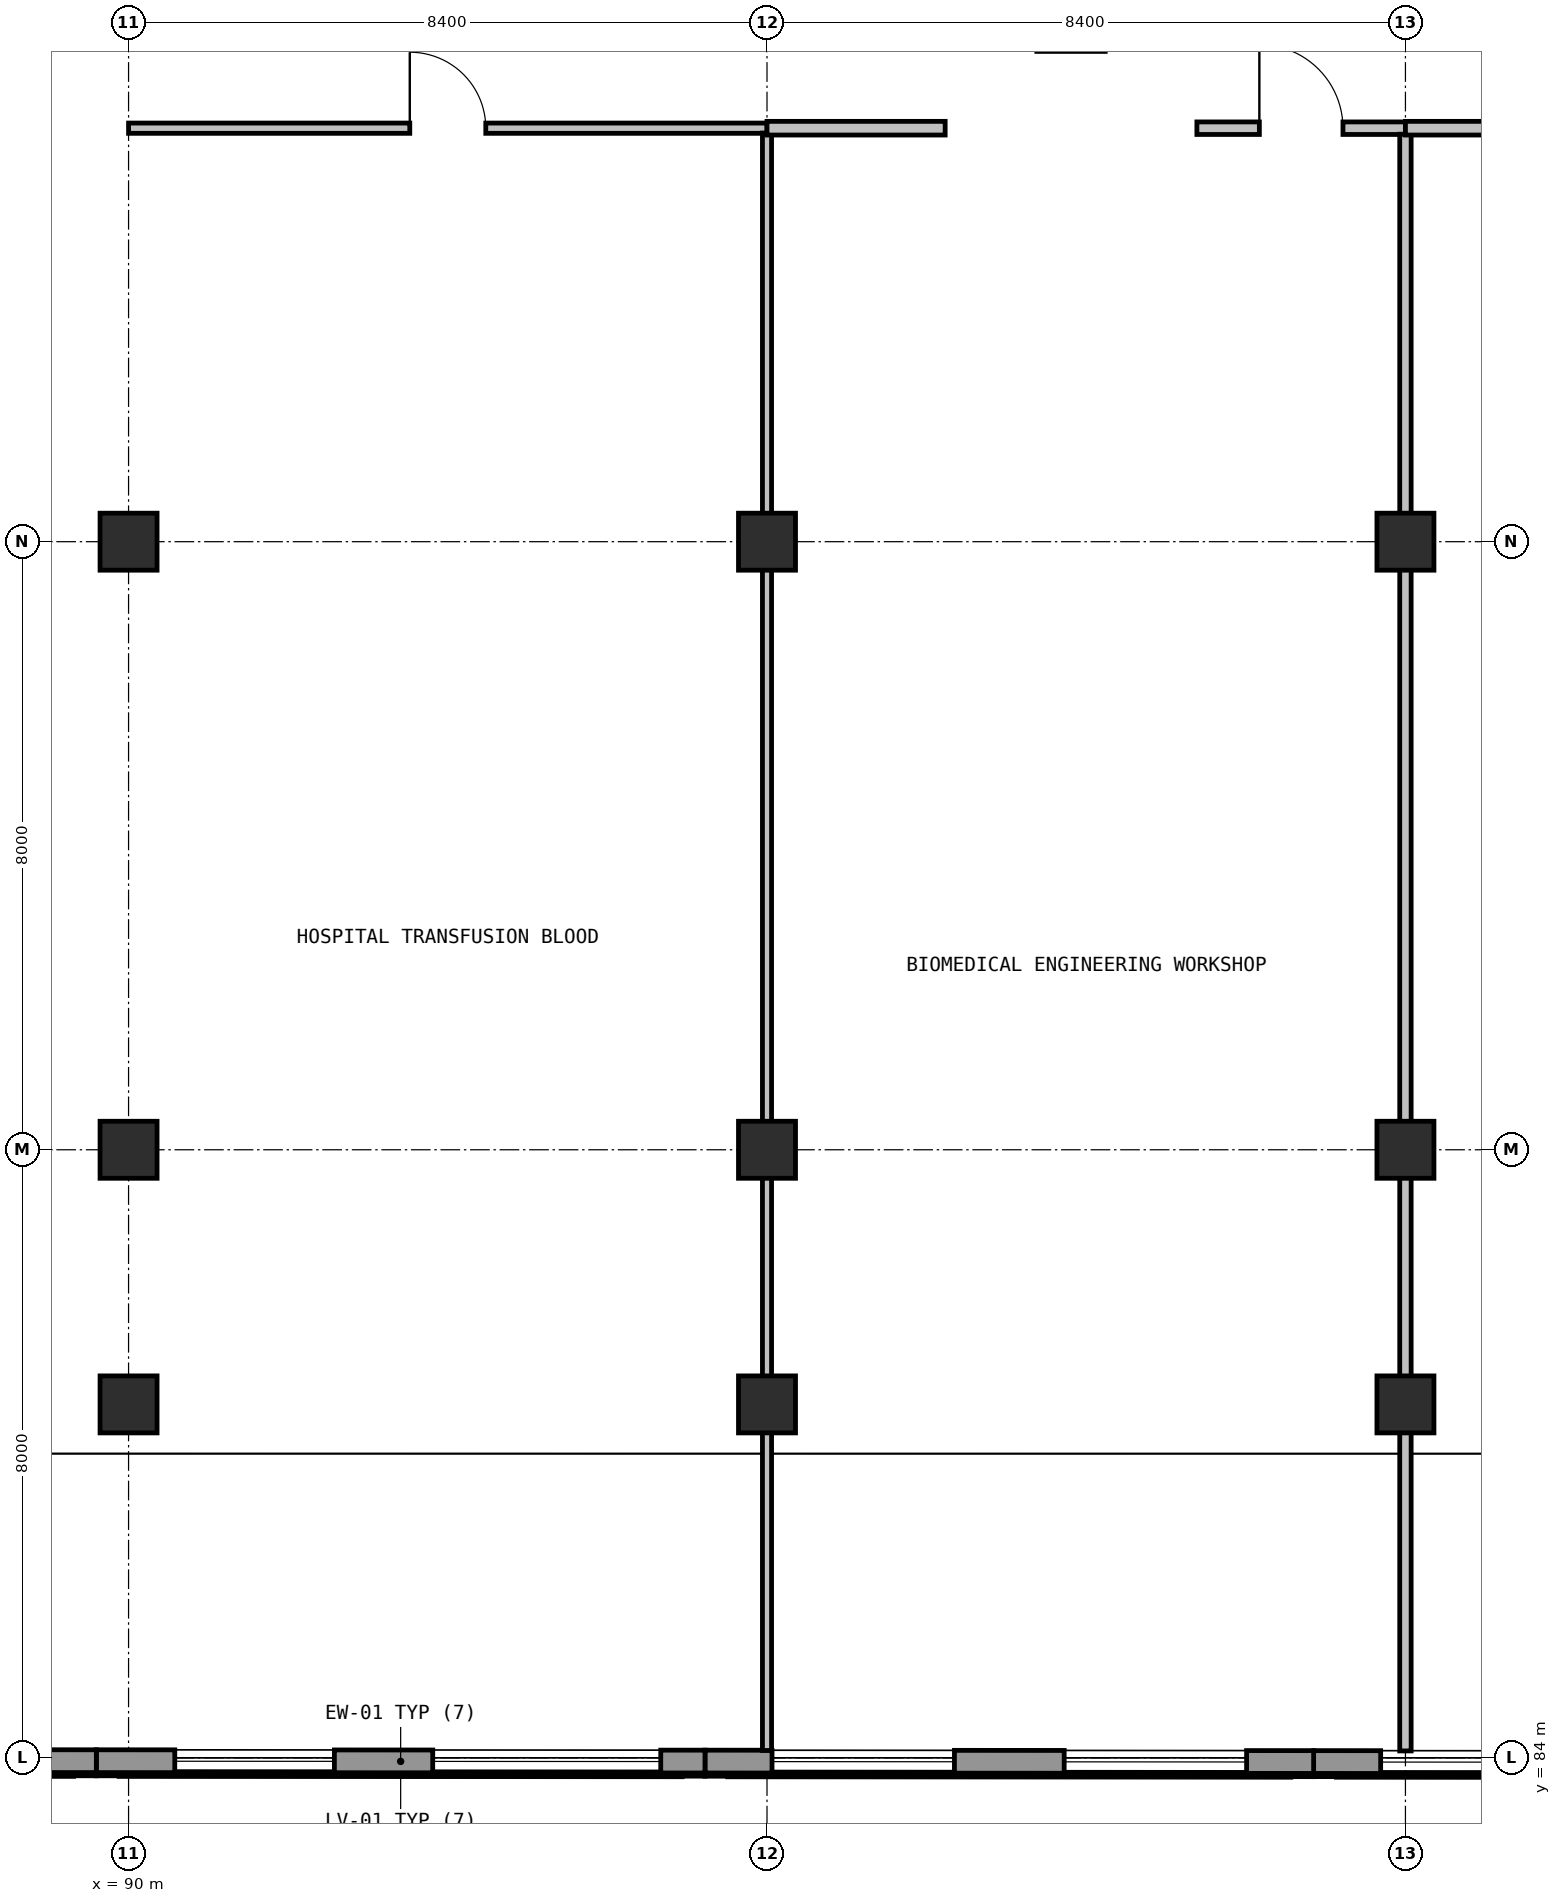
"""IFC4 building model, lengths in metres.
Left out: names, types, materials, properties, quantities, classifications, styles, units other than length and angle.
Written with IfcOpenShell. Run it as: python <this file> out.ifc"""

import sys

from ifc_helpers import new_model, si_unit, direction, frame, frame_2d, origin, origin_2d, place, context, subcontext, project, spatial, rectangle, extrude, element, fill, save


model = new_model("IFC4")
c1 = context("Model", 3, precision=1e-05, world=origin(), true_north=direction((0.0, 1.0)))
c2 = subcontext(c1, "Body", "Model", "MODEL_VIEW")
j1 = project(units=[si_unit("LENGTHUNIT", "METRE"), si_unit("PLANEANGLEUNIT", "RADIAN")], contexts=[c1])
p1 = place(None, origin())
s1 = spatial("IfcSite", under=j1, at=p1, CompositionType="ELEMENT")
p2 = place(p1, origin())
s2 = spatial("IfcBuilding", under=s1, at=p2, CompositionType="ELEMENT")
p3 = place(p2, frame((0.0, 0.0, 15.0)))
s3 = spatial("IfcBuildingStorey", under=s2, at=p3, CompositionType="ELEMENT", Elevation=15.0)
for number, where, z_axis, x_axis in (
    (1, (90.0, 88.65, 0.0), (0.0, 0.0, 1.0), (1.0, 0.0, 0.0)),
    (2, (90.0, 92.0, 0.0), (0.0, 0.0, 1.0), (1.0, 0.0, 0.0)),
    (3, (90.0, 100.0, 0.0), (0.0, 0.0, 1.0), (1.0, 0.0, 0.0)),
    (4, (98.4, 88.65, 0.0), (0.0, 0.0, 1.0), (1.0, 0.0, 0.0)),
    (5, (98.4, 92.0, 0.0), (0.0, 0.0, 1.0), (1.0, 0.0, 0.0)),
    (6, (98.4, 100.0, 0.0), (0.0, 0.0, 1.0), (1.0, 0.0, 0.0)),
    (7, (106.8, 88.65, 0.0), (0.0, 0.0, 1.0), (1.0, 0.0, 0.0)),
    (8, (106.8, 92.0, 0.0), (0.0, 0.0, 1.0), (1.0, 0.0, 0.0)),
    (9, (106.8, 100.0, 0.0), (0.0, 0.0, 1.0), (1.0, 0.0, 0.0)),
):
    element("IfcColumn", number, at=place(p3, frame(where, z_axis=z_axis, x_axis=x_axis)), inside=s3, PredefinedType="COLUMN", context=c2, shape_type="SweptSolid", body=[
        extrude(rectangle(XDim=0.75, YDim=0.75, at=origin_2d()), origin(), (0.0, 0.0, 1.0), 4.2),
    ])
p4 = place(p3, frame((113.6, 83.94, 0.0), z_axis=(0.0, 0.0, 1.0), x_axis=(-0.999999795056, 0.000640224252, 0.0)))
e10 = element("IfcWall", 10, at=p4, inside=s3, PredefinedType="SOLIDWALL", context=c2, shape_type="SweptSolid", body=[
    extrude(rectangle(XDim=8.008, YDim=0.3, at=frame_2d((4.004, 0.0))), origin(), (0.0, 0.0, 1.0), 3.895),
])
p5 = place(p4, frame((0.882, 0.0, 0.96)))
e11 = element("IfcOpeningElement", 11, at=p5, cuts=e10, PredefinedType="OPENING", context=c2, shape_type="SweptSolid", body=[
    extrude(rectangle(XDim=2.4, YDim=1.2, at=frame_2d((1.2, 0.6))), frame((0.0, 0.16, 0.0), z_axis=(0.0, -1.0, 0.0), x_axis=(1.0, 0.0, 0.0)), (0.0, 0.0, 1.0), 0.32),
])
p6 = place(p4, frame((4.726, 0.0, 0.96)))
e12 = element("IfcOpeningElement", 12, at=p6, cuts=e10, PredefinedType="OPENING", context=c2, shape_type="SweptSolid", body=[
    extrude(rectangle(XDim=2.4, YDim=1.2, at=frame_2d((1.2, 0.6))), frame((0.0, 0.16, 0.0), z_axis=(0.0, -1.0, 0.0), x_axis=(1.0, 0.0, 0.0)), (0.0, 0.0, 1.0), 0.32),
])
p7 = place(p3, frame((105.592, 83.945, 0.0), z_axis=(0.0, 0.0, 1.0), x_axis=(-0.999999732319, 0.000731684814, 0.0)))
e13 = element("IfcWall", 13, at=p7, inside=s3, PredefinedType="SOLIDWALL", context=c2, shape_type="SweptSolid", body=[
    extrude(rectangle(XDim=8.008, YDim=0.3, at=frame_2d((4.004, 0.0))), origin(), (0.0, 0.0, 1.0), 3.895),
])
p8 = place(p7, frame((0.882, 0.0, 0.96)))
e14 = element("IfcOpeningElement", 14, at=p8, cuts=e13, PredefinedType="OPENING", context=c2, shape_type="SweptSolid", body=[
    extrude(rectangle(XDim=2.4, YDim=1.2, at=frame_2d((1.2, 0.6))), frame((0.0, 0.16, 0.0), z_axis=(0.0, -1.0, 0.0), x_axis=(1.0, 0.0, 0.0)), (0.0, 0.0, 1.0), 0.32),
])
p9 = place(p7, frame((4.726, 0.0, 0.96)))
e15 = element("IfcOpeningElement", 15, at=p9, cuts=e13, PredefinedType="OPENING", context=c2, shape_type="SweptSolid", body=[
    extrude(rectangle(XDim=2.4, YDim=1.2, at=frame_2d((1.2, 0.6))), frame((0.0, 0.16, 0.0), z_axis=(0.0, -1.0, 0.0), x_axis=(1.0, 0.0, 0.0)), (0.0, 0.0, 1.0), 0.32),
])
p10 = place(p3, frame((97.584, 83.951, 0.0), z_axis=(0.0, 0.0, 1.0), x_axis=(-0.999999795056, 0.000640224252, 0.0)))
e16 = element("IfcWall", 16, at=p10, inside=s3, PredefinedType="SOLIDWALL", context=c2, shape_type="SweptSolid", body=[
    extrude(rectangle(XDim=8.008, YDim=0.3, at=frame_2d((4.004, 0.0))), origin(), (0.0, 0.0, 1.0), 3.895),
])
p11 = place(p10, frame((0.582, 0.0, 0.96)))
e17 = element("IfcOpeningElement", 17, at=p11, cuts=e16, PredefinedType="OPENING", context=c2, shape_type="SweptSolid", body=[
    extrude(rectangle(XDim=3.0, YDim=1.35, at=frame_2d((1.5, 0.675))), frame((0.0, 0.16, 0.0), z_axis=(0.0, -1.0, 0.0), x_axis=(1.0, 0.0, 0.0)), (0.0, 0.0, 1.0), 0.32),
])
p12 = place(p10, frame((4.876, 0.0, 0.96)))
e18 = element("IfcOpeningElement", 18, at=p12, cuts=e16, PredefinedType="OPENING", context=c2, shape_type="SweptSolid", body=[
    extrude(rectangle(XDim=2.1, YDim=1.5, at=frame_2d((1.05, 0.75))), frame((0.0, 0.16, 0.0), z_axis=(0.0, -1.0, 0.0), x_axis=(1.0, 0.0, 0.0)), (0.0, 0.0, 1.0), 0.32),
])
p13 = place(p3, frame((89.576, 83.956, 0.0), z_axis=(0.0, 0.0, 1.0), x_axis=(-0.999999814099, 0.000609755984, 0.0)))
e19 = element("IfcWall", 19, at=p13, inside=s3, PredefinedType="SOLIDWALL", context=c2, shape_type="SweptSolid", body=[
    extrude(rectangle(XDim=8.008, YDim=0.3, at=frame_2d((4.004, 0.0))), origin(), (0.0, 0.0, 1.0), 3.895),
])
p14 = place(p13, frame((1.032, 0.0, 0.96)))
e20 = element("IfcOpeningElement", 20, at=p14, cuts=e19, PredefinedType="OPENING", context=c2, shape_type="SweptSolid", body=[
    extrude(rectangle(XDim=2.1, YDim=1.5, at=frame_2d((1.05, 0.75))), frame((0.0, 0.16, 0.0), z_axis=(0.0, -1.0, 0.0), x_axis=(1.0, 0.0, 0.0)), (0.0, 0.0, 1.0), 0.32),
])
p15 = place(p13, frame((4.876, 0.0, 0.96)))
e21 = element("IfcOpeningElement", 21, at=p15, cuts=e19, PredefinedType="OPENING", context=c2, shape_type="SweptSolid", body=[
    extrude(rectangle(XDim=2.1, YDim=1.5, at=frame_2d((1.05, 0.75))), frame((0.0, 0.16, 0.0), z_axis=(0.0, -1.0, 0.0), x_axis=(1.0, 0.0, 0.0)), (0.0, 0.0, 1.0), 0.32),
])
p16 = place(p3, frame((90.0, 105.44, 0.0), z_axis=(0.0, 0.0, 1.0), x_axis=(1.0, 0.0, 0.0)))
e22 = element("IfcWall", 22, at=p16, inside=s3, PredefinedType="PARTITIONING", context=c2, shape_type="SweptSolid", body=[
    extrude(rectangle(XDim=8.4, YDim=0.135, at=frame_2d((4.2, 0.0))), origin(), (0.0, 0.0, 1.0), 3.895),
])
p17 = place(p16, frame((3.7, 0.0, 0.0)))
e23 = element("IfcOpeningElement", 23, at=p17, cuts=e22, PredefinedType="OPENING", context=c2, shape_type="SweptSolid", body=[
    extrude(rectangle(XDim=1.0, YDim=2.15, at=frame_2d((0.5, 1.075))), frame((0.0, 0.077, 0.0), z_axis=(0.0, -1.0, 0.0), x_axis=(1.0, 0.0, 0.0)), (0.0, 0.0, 1.0), 0.155),
])
p18 = place(p3, frame((98.4, 105.376, 0.0), z_axis=(0.0, 0.0, 1.0), x_axis=(0.0, -1.0, 0.0)))
e24 = element("IfcWall", 24, at=p18, inside=s3, PredefinedType="PARTITIONING", context=c2, shape_type="SweptSolid", body=[
    extrude(rectangle(XDim=21.279, YDim=0.12, at=frame_2d((10.64, 0.0))), origin(), (0.0, 0.0, 1.0), 3.245),
])
p19 = place(p3, frame((98.4, 105.44, 0.0), z_axis=(0.0, 0.0, 1.0), x_axis=(1.0, 0.0, 0.0)))
e25 = element("IfcWall", 25, at=p19, inside=s3, PredefinedType="PARTITIONING", context=c2, shape_type="SweptSolid", body=[
    extrude(rectangle(XDim=2.344, YDim=0.18, at=frame_2d((1.172, 0.0))), origin(), (0.0, 0.0, 1.0), 3.895),
])
p20 = place(p3, frame((104.056, 105.44, 0.0), z_axis=(0.0, 0.0, 1.0), x_axis=(1.0, 0.0, 0.0)))
e26 = element("IfcWall", 26, at=p20, inside=s3, PredefinedType="PARTITIONING", context=c2, shape_type="SweptSolid", body=[
    extrude(rectangle(XDim=2.744, YDim=0.165, at=frame_2d((1.372, 0.0))), origin(), (0.0, 0.0, 1.0), 3.895),
])
p21 = place(p20, frame((0.822, 0.0, 0.0)))
e27 = element("IfcOpeningElement", 27, at=p21, cuts=e26, PredefinedType="OPENING", context=c2, shape_type="SweptSolid", body=[
    extrude(rectangle(XDim=1.1, YDim=2.15, at=frame_2d((0.55, 1.075))), frame((0.0, 0.093, 0.0), z_axis=(0.0, -1.0, 0.0), x_axis=(1.0, 0.0, 0.0)), (0.0, 0.0, 1.0), 0.185),
])
p22 = place(p3, frame((106.8, 105.361, 0.0), z_axis=(0.0, 0.0, 1.0), x_axis=(0.0, -1.0, 0.0)))
e28 = element("IfcWall", 28, at=p22, inside=s3, PredefinedType="PARTITIONING", context=c2, shape_type="SweptSolid", body=[
    extrude(rectangle(XDim=21.27, YDim=0.15, at=frame_2d((10.635, 0.0))), origin(), (0.0, 0.0, 1.0), 3.245),
])
p23 = place(p3, frame((106.8, 105.44, 0.0), z_axis=(0.0, 0.0, 1.0), x_axis=(1.0, 0.0, 0.0)))
e29 = element("IfcWall", 29, at=p23, inside=s3, PredefinedType="PARTITIONING", context=c2, shape_type="SweptSolid", body=[
    extrude(rectangle(XDim=6.744, YDim=0.18, at=frame_2d((3.372, 0.0))), origin(), (0.0, 0.0, 1.0), 3.895),
])
p24 = place(p6, origin())
e30 = element("IfcWindow", 30, at=p24, inside=s3, PartitioningType="SINGLE_PANEL", PredefinedType="WINDOW", context=c2, shape_type="SweptSolid", body=[
    extrude(rectangle(XDim=2.4, YDim=1.2, at=frame_2d((1.2, 0.6))), frame((0.0, 0.03, 0.0), z_axis=(0.0, -1.0, 0.0), x_axis=(1.0, 0.0, 0.0)), (0.0, 0.0, 1.0), 0.06),
])
fill(e12, e30)
p25 = place(p8, origin())
e31 = element("IfcWindow", 31, at=p25, inside=s3, PartitioningType="SINGLE_PANEL", PredefinedType="WINDOW", context=c2, shape_type="SweptSolid", body=[
    extrude(rectangle(XDim=2.4, YDim=1.2, at=frame_2d((1.2, 0.6))), frame((0.0, 0.03, 0.0), z_axis=(0.0, -1.0, 0.0), x_axis=(1.0, 0.0, 0.0)), (0.0, 0.0, 1.0), 0.06),
])
fill(e14, e31)
p26 = place(p9, origin())
e32 = element("IfcWindow", 32, at=p26, inside=s3, PartitioningType="SINGLE_PANEL", PredefinedType="WINDOW", context=c2, shape_type="SweptSolid", body=[
    extrude(rectangle(XDim=2.4, YDim=1.2, at=frame_2d((1.2, 0.6))), frame((0.0, 0.03, 0.0), z_axis=(0.0, -1.0, 0.0), x_axis=(1.0, 0.0, 0.0)), (0.0, 0.0, 1.0), 0.06),
])
fill(e15, e32)
p27 = place(p11, origin())
e33 = element("IfcWindow", 33, at=p27, inside=s3, PartitioningType="SINGLE_PANEL", PredefinedType="WINDOW", context=c2, shape_type="SweptSolid", body=[
    extrude(rectangle(XDim=3.0, YDim=1.35, at=frame_2d((1.5, 0.675))), frame((0.0, 0.03, 0.0), z_axis=(0.0, -1.0, 0.0), x_axis=(1.0, 0.0, 0.0)), (0.0, 0.0, 1.0), 0.06),
])
fill(e17, e33)
p28 = place(p12, origin())
e34 = element("IfcWindow", 34, at=p28, inside=s3, PartitioningType="SINGLE_PANEL", PredefinedType="WINDOW", context=c2, shape_type="SweptSolid", body=[
    extrude(rectangle(XDim=2.1, YDim=1.5, at=frame_2d((1.05, 0.75))), frame((0.0, 0.03, 0.0), z_axis=(0.0, -1.0, 0.0), x_axis=(1.0, 0.0, 0.0)), (0.0, 0.0, 1.0), 0.06),
])
fill(e18, e34)
p29 = place(p17, origin())
e35 = element("IfcDoor", 35, at=p29, inside=s3, OperationType="SINGLE_SWING_RIGHT", PredefinedType="DOOR", context=c2, shape_type="SweptSolid", body=[
    extrude(rectangle(XDim=1.0, YDim=2.15, at=frame_2d((0.5, 1.075))), frame((0.0, 0.025, 0.0), z_axis=(0.0, -1.0, 0.0), x_axis=(1.0, 0.0, 0.0)), (0.0, 0.0, 1.0), 0.05),
])
fill(e23, e35)
p30 = place(p21, origin())
e36 = element("IfcDoor", 36, at=p30, inside=s3, OperationType="SINGLE_SWING_LEFT", PredefinedType="DOOR", context=c2, shape_type="SweptSolid", body=[
    extrude(rectangle(XDim=1.1, YDim=2.15, at=frame_2d((0.55, 1.075))), frame((0.0, 0.025, 0.0), z_axis=(0.0, -1.0, 0.0), x_axis=(1.0, 0.0, 0.0)), (0.0, 0.0, 1.0), 0.05),
])
fill(e27, e36)
save(model, sys.argv[1])
